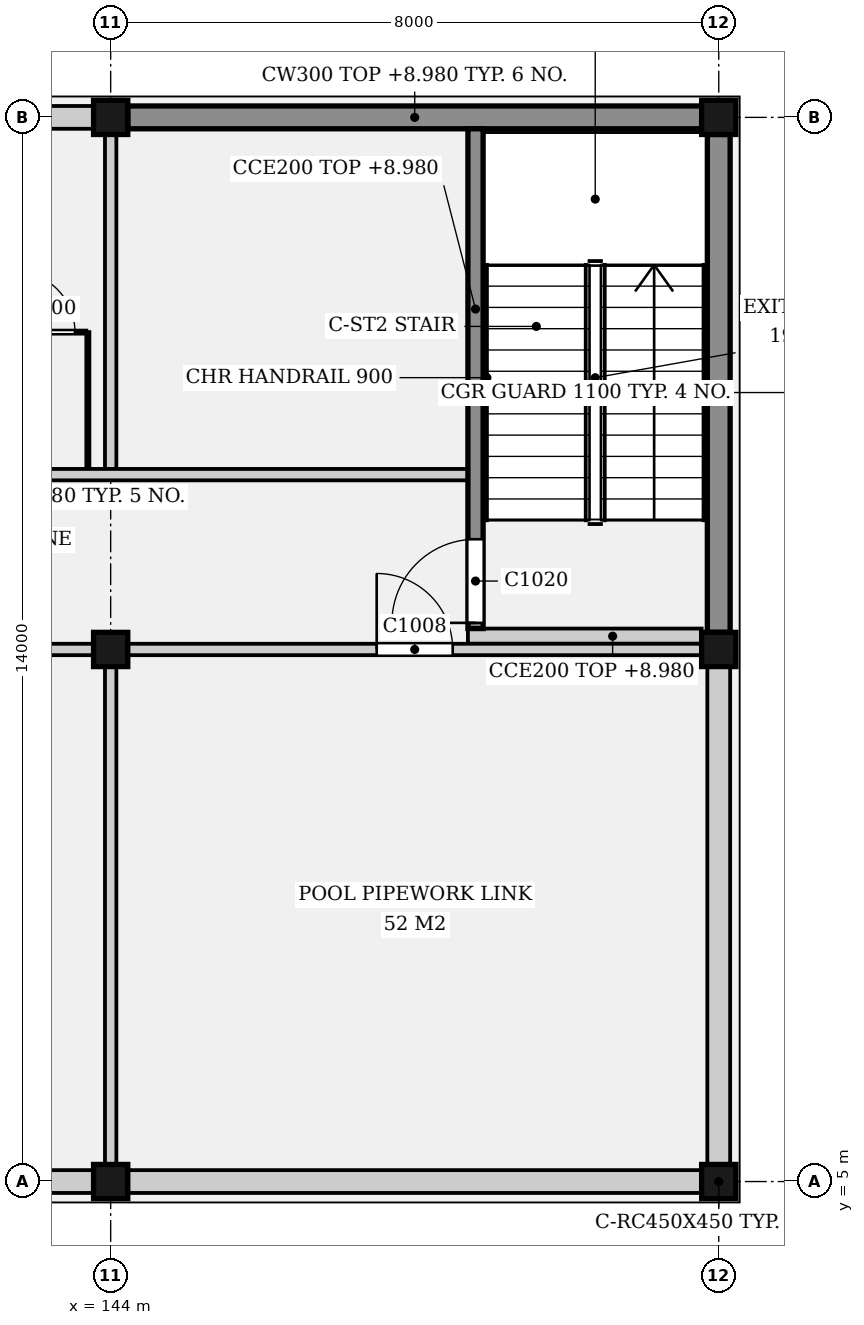
"""IFC4 building model, lengths in metres.
Left out: names, types, materials, properties, quantities, classifications, styles, units other than length and angle.
Written with IfcOpenShell. Run it as: python <this file> out.ifc"""

import sys

from ifc_helpers import new_model, si_unit, direction, frame, frame_2d, origin, origin_2d, place, context, subcontext, project, spatial, rectangle, extrude, element, fill, save


model = new_model("IFC4")
c1 = context("Model", 3, precision=1e-05, world=origin(), true_north=direction((0.0, 1.0)))
c2 = subcontext(c1, "Body", "Model", "MODEL_VIEW")
j1 = project(units=[si_unit("LENGTHUNIT", "METRE"), si_unit("PLANEANGLEUNIT", "RADIAN")], contexts=[c1])
p1 = place(None, origin())
s1 = spatial("IfcSite", under=j1, at=p1, CompositionType="ELEMENT")
p2 = place(p1, origin())
s2 = spatial("IfcBuilding", under=s1, at=p2, CompositionType="ELEMENT")
p3 = place(p2, frame((0.0, 0.0, 5.0)))
s3 = spatial("IfcBuildingStorey", under=s2, at=p3, CompositionType="ELEMENT", Elevation=5.0)
for number, where, z_axis, x_axis in (
    (1, (144.0, 5.0, 0.0), (0.0, 0.0, 1.0), (1.0, 0.0, 0.0)),
    (2, (144.0, 12.0, 0.0), (0.0, 0.0, 1.0), (1.0, 0.0, 0.0)),
    (3, (144.0, 19.0, 0.0), (0.0, 0.0, 1.0), (1.0, 0.0, 0.0)),
    (4, (152.0, 5.0, 0.0), (0.0, 0.0, 1.0), (1.0, 0.0, 0.0)),
    (5, (152.0, 12.0, 0.0), (0.0, 0.0, 1.0), (1.0, 0.0, 0.0)),
    (6, (152.0, 19.0, 0.0), (0.0, 0.0, 1.0), (1.0, 0.0, 0.0)),
):
    element("IfcColumn", number, at=place(p3, frame(where, z_axis=z_axis, x_axis=x_axis)), inside=s3, PredefinedType="COLUMN", context=c2, shape_type="SweptSolid", body=[
        extrude(rectangle(XDim=0.45, YDim=0.45, at=origin_2d()), origin(), (0.0, 0.0, 1.0), 4.4),
    ])
p4 = place(p3, frame((132.225, 5.0, 0.0), z_axis=(0.0, 0.0, 1.0), x_axis=(1.0, 0.0, 0.0)))
e7 = element("IfcWall", 7, at=p4, inside=s3, PredefinedType="ELEMENTEDWALL", context=c2, shape_type="SweptSolid", body=[
    extrude(rectangle(XDim=11.55, YDim=0.3, at=frame_2d((5.775, 0.0))), origin(), (0.0, 0.0, 1.0), 3.98),
])
p5 = place(p4, frame((1.458, 0.0, 1.4)))
e8 = element("IfcOpeningElement", 8, at=p5, cuts=e7, PredefinedType="OPENING", context=c2, shape_type="SweptSolid", body=[
    extrude(rectangle(XDim=1.6, YDim=1.2, at=frame_2d((0.8, 0.6))), frame((0.0, 0.16, 0.0), z_axis=(0.0, -1.0, 0.0), x_axis=(1.0, 0.0, 0.0)), (0.0, 0.0, 1.0), 0.32),
])
p6 = place(p4, frame((4.975, 0.0, 1.4)))
e9 = element("IfcOpeningElement", 9, at=p6, cuts=e7, PredefinedType="OPENING", context=c2, shape_type="SweptSolid", body=[
    extrude(rectangle(XDim=1.6, YDim=1.2, at=frame_2d((0.8, 0.6))), frame((0.0, 0.16, 0.0), z_axis=(0.0, -1.0, 0.0), x_axis=(1.0, 0.0, 0.0)), (0.0, 0.0, 1.0), 0.32),
])
p7 = place(p4, frame((8.492, 0.0, 1.4)))
e10 = element("IfcOpeningElement", 10, at=p7, cuts=e7, PredefinedType="OPENING", context=c2, shape_type="SweptSolid", body=[
    extrude(rectangle(XDim=1.6, YDim=1.2, at=frame_2d((0.8, 0.6))), frame((0.0, 0.16, 0.0), z_axis=(0.0, -1.0, 0.0), x_axis=(1.0, 0.0, 0.0)), (0.0, 0.0, 1.0), 0.32),
])
p8 = place(p3, frame((144.225, 5.0, 0.0), z_axis=(0.0, 0.0, 1.0), x_axis=(1.0, 0.0, 0.0)))
e11 = element("IfcWall", 11, at=p8, inside=s3, PredefinedType="ELEMENTEDWALL", context=c2, shape_type="SweptSolid", body=[
    extrude(rectangle(XDim=7.55, YDim=0.3, at=frame_2d((3.775, 0.0))), origin(), (0.0, 0.0, 1.0), 3.98),
])
p9 = place(p3, frame((132.225, 19.0, 0.0), z_axis=(0.0, 0.0, 1.0), x_axis=(1.0, 0.0, 0.0)))
e12 = element("IfcWall", 12, at=p9, inside=s3, PredefinedType="ELEMENTEDWALL", context=c2, shape_type="SweptSolid", body=[
    extrude(rectangle(XDim=11.55, YDim=0.3, at=frame_2d((5.775, 0.0))), origin(), (0.0, 0.0, 1.0), 3.98),
])
p10 = place(p9, frame((1.458, 0.0, 1.4)))
e13 = element("IfcOpeningElement", 13, at=p10, cuts=e12, PredefinedType="OPENING", context=c2, shape_type="SweptSolid", body=[
    extrude(rectangle(XDim=1.6, YDim=1.2, at=frame_2d((0.8, 0.6))), frame((0.0, 0.16, 0.0), z_axis=(0.0, -1.0, 0.0), x_axis=(1.0, 0.0, 0.0)), (0.0, 0.0, 1.0), 0.32),
])
p11 = place(p9, frame((4.975, 0.0, 1.4)))
e14 = element("IfcOpeningElement", 14, at=p11, cuts=e12, PredefinedType="OPENING", context=c2, shape_type="SweptSolid", body=[
    extrude(rectangle(XDim=1.6, YDim=1.2, at=frame_2d((0.8, 0.6))), frame((0.0, 0.16, 0.0), z_axis=(0.0, -1.0, 0.0), x_axis=(1.0, 0.0, 0.0)), (0.0, 0.0, 1.0), 0.32),
])
p12 = place(p9, frame((8.492, 0.0, 1.4)))
e15 = element("IfcOpeningElement", 15, at=p12, cuts=e12, PredefinedType="OPENING", context=c2, shape_type="SweptSolid", body=[
    extrude(rectangle(XDim=1.6, YDim=1.2, at=frame_2d((0.8, 0.6))), frame((0.0, 0.16, 0.0), z_axis=(0.0, -1.0, 0.0), x_axis=(1.0, 0.0, 0.0)), (0.0, 0.0, 1.0), 0.32),
])
p13 = place(p3, frame((144.225, 19.0, 0.0), z_axis=(0.0, 0.0, 1.0), x_axis=(1.0, 0.0, 0.0)))
e16 = element("IfcWall", 16, at=p13, inside=s3, PredefinedType="ELEMENTEDWALL", context=c2, shape_type="SweptSolid", body=[
    extrude(rectangle(XDim=7.55, YDim=0.3, at=frame_2d((3.775, 0.0))), origin(), (0.0, 0.0, 1.0), 3.98),
])
for number, where, z_axis, x_axis in (
    (17, (152.0, 5.225, 0.0), (0.0, 0.0, 1.0), (0.0, 1.0, 0.0)),
    (18, (152.0, 12.225, 0.0), (0.0, 0.0, 1.0), (0.0, 1.0, 0.0)),
):
    element("IfcWall", number, at=place(p3, frame(where, z_axis=z_axis, x_axis=x_axis)), inside=s3, PredefinedType="ELEMENTEDWALL", context=c2, shape_type="SweptSolid", body=[
        extrude(rectangle(XDim=6.55, YDim=0.3, at=frame_2d((3.275, 0.0))), origin(), (0.0, 0.0, 1.0), 3.98),
    ])
p14 = place(p3, frame((132.225, 12.0, 0.0), z_axis=(0.0, 0.0, 1.0), x_axis=(1.0, 0.0, 0.0)))
e19 = element("IfcWall", 19, at=p14, inside=s3, PredefinedType="PARTITIONING", context=c2, shape_type="SweptSolid", body=[
    extrude(rectangle(XDim=11.55, YDim=0.15, at=frame_2d((5.775, 0.0))), origin(), (0.0, 0.0, 1.0), 3.98),
])
p15 = place(p14, frame((5.275, 0.0, 0.0)))
e20 = element("IfcOpeningElement", 20, at=p15, cuts=e19, PredefinedType="OPENING", context=c2, shape_type="SweptSolid", body=[
    extrude(rectangle(XDim=1.0, YDim=2.1, at=frame_2d((0.5, 1.05))), frame((0.0, 0.085, 0.0), z_axis=(0.0, -1.0, 0.0), x_axis=(1.0, 0.0, 0.0)), (0.0, 0.0, 1.0), 0.17),
])
p16 = place(p3, frame((144.225, 12.0, 0.0), z_axis=(0.0, 0.0, 1.0), x_axis=(1.0, 0.0, 0.0)))
e21 = element("IfcWall", 21, at=p16, inside=s3, PredefinedType="PARTITIONING", context=c2, shape_type="SweptSolid", body=[
    extrude(rectangle(XDim=7.55, YDim=0.15, at=frame_2d((3.775, 0.0))), origin(), (0.0, 0.0, 1.0), 3.98),
])
p17 = place(p16, frame((3.275, 0.0, 0.0)))
e22 = element("IfcOpeningElement", 22, at=p17, cuts=e21, PredefinedType="OPENING", context=c2, shape_type="SweptSolid", body=[
    extrude(rectangle(XDim=1.0, YDim=2.1, at=frame_2d((0.5, 1.05))), frame((0.0, 0.085, 0.0), z_axis=(0.0, -1.0, 0.0), x_axis=(1.0, 0.0, 0.0)), (0.0, 0.0, 1.0), 0.17),
])
p18 = place(p3, frame((55.3, 14.3, 0.0), z_axis=(0.0, 0.0, 1.0), x_axis=(1.0, 0.0, 0.0)))
e23 = element("IfcWall", 23, at=p18, inside=s3, PredefinedType="PARTITIONING", context=c2, shape_type="SweptSolid", body=[
    extrude(rectangle(XDim=93.4, YDim=0.15, at=frame_2d((46.7, 0.0))), origin(), (0.0, 0.0, 1.0), 3.98),
])
p19 = place(p18, frame((15.8, 0.0, 0.0)))
e24 = element("IfcOpeningElement", 24, at=p19, cuts=e23, PredefinedType="OPENING", context=c2, shape_type="SweptSolid", body=[
    extrude(rectangle(XDim=1.8, YDim=2.4, at=frame_2d((0.9, 1.2))), frame((0.0, 0.085, 0.0), z_axis=(0.0, -1.0, 0.0), x_axis=(1.0, 0.0, 0.0)), (0.0, 0.0, 1.0), 0.17),
])
p20 = place(p18, frame((32.2, 0.0, 0.0)))
e25 = element("IfcOpeningElement", 25, at=p20, cuts=e23, PredefinedType="OPENING", context=c2, shape_type="SweptSolid", body=[
    extrude(rectangle(XDim=1.0, YDim=2.1, at=frame_2d((0.5, 1.05))), frame((0.0, 0.085, 0.0), z_axis=(0.0, -1.0, 0.0), x_axis=(1.0, 0.0, 0.0)), (0.0, 0.0, 1.0), 0.17),
])
p21 = place(p18, frame((38.2, 0.0, 0.0)))
e26 = element("IfcOpeningElement", 26, at=p21, cuts=e23, PredefinedType="OPENING", context=c2, shape_type="SweptSolid", body=[
    extrude(rectangle(XDim=1.0, YDim=2.1, at=frame_2d((0.5, 1.05))), frame((0.0, 0.085, 0.0), z_axis=(0.0, -1.0, 0.0), x_axis=(1.0, 0.0, 0.0)), (0.0, 0.0, 1.0), 0.17),
])
p22 = place(p18, frame((45.7, 0.0, 0.0)))
e27 = element("IfcOpeningElement", 27, at=p22, cuts=e23, PredefinedType="OPENING", context=c2, shape_type="SweptSolid", body=[
    extrude(rectangle(XDim=0.9, YDim=2.1, at=frame_2d((0.45, 1.05))), frame((0.0, 0.085, 0.0), z_axis=(0.0, -1.0, 0.0), x_axis=(1.0, 0.0, 0.0)), (0.0, 0.0, 1.0), 0.17),
])
p23 = place(p18, frame((58.2, 0.0, 0.0)))
e28 = element("IfcOpeningElement", 28, at=p23, cuts=e23, PredefinedType="OPENING", context=c2, shape_type="SweptSolid", body=[
    extrude(rectangle(XDim=1.0, YDim=2.1, at=frame_2d((0.5, 1.05))), frame((0.0, 0.085, 0.0), z_axis=(0.0, -1.0, 0.0), x_axis=(1.0, 0.0, 0.0)), (0.0, 0.0, 1.0), 0.17),
])
p24 = place(p18, frame((70.2, 0.0, 0.0)))
e29 = element("IfcOpeningElement", 29, at=p24, cuts=e23, PredefinedType="OPENING", context=c2, shape_type="SweptSolid", body=[
    extrude(rectangle(XDim=1.0, YDim=2.1, at=frame_2d((0.5, 1.05))), frame((0.0, 0.085, 0.0), z_axis=(0.0, -1.0, 0.0), x_axis=(1.0, 0.0, 0.0)), (0.0, 0.0, 1.0), 0.17),
])
p25 = place(p18, frame((81.68, 0.0, 0.0)))
e30 = element("IfcOpeningElement", 30, at=p25, cuts=e23, PredefinedType="OPENING", context=c2, shape_type="SweptSolid", body=[
    extrude(rectangle(XDim=0.9, YDim=2.1, at=frame_2d((0.45, 1.05))), frame((0.0, 0.085, 0.0), z_axis=(0.0, -1.0, 0.0), x_axis=(1.0, 0.0, 0.0)), (0.0, 0.0, 1.0), 0.17),
])
p26 = place(p3, frame((144.0, 5.225, 0.0), z_axis=(0.0, 0.0, 1.0), x_axis=(0.0, 1.0, 0.0)))
e31 = element("IfcWall", 31, at=p26, inside=s3, PredefinedType="PARTITIONING", context=c2, shape_type="SweptSolid", body=[
    extrude(rectangle(XDim=6.55, YDim=0.15, at=frame_2d((3.275, 0.0))), origin(), (0.0, 0.0, 1.0), 3.98),
])
p27 = place(p3, frame((144.0, 14.375, 0.0), z_axis=(0.0, 0.0, 1.0), x_axis=(0.0, 1.0, 0.0)))
e32 = element("IfcWall", 32, at=p27, inside=s3, PredefinedType="PARTITIONING", context=c2, shape_type="SweptSolid", body=[
    extrude(rectangle(XDim=4.4, YDim=0.15, at=frame_2d((2.2, 0.0))), origin(), (0.0, 0.0, 1.0), 3.98),
])
p28 = place(p3, frame((148.8, 12.275, 0.0), z_axis=(0.0, 0.0, 1.0), x_axis=(0.0, 1.0, 0.0)))
e33 = element("IfcWall", 33, at=p28, inside=s3, PredefinedType="SOLIDWALL", context=c2, shape_type="SweptSolid", body=[
    extrude(rectangle(XDim=6.575, YDim=0.2, at=frame_2d((3.288, 0.0))), origin(), (0.0, 0.0, 1.0), 3.98),
])
p29 = place(p28, frame((0.075, 0.0, 0.0)))
e34 = element("IfcOpeningElement", 34, at=p29, cuts=e33, PredefinedType="OPENING", context=c2, shape_type="SweptSolid", body=[
    extrude(rectangle(XDim=1.1, YDim=2.1, at=frame_2d((0.55, 1.05))), frame((0.0, 0.11, 0.0), z_axis=(0.0, -1.0, 0.0), x_axis=(1.0, 0.0, 0.0)), (0.0, 0.0, 1.0), 0.22),
])
p30 = place(p3, frame((148.7, 12.175, 0.0), z_axis=(0.0, 0.0, 1.0), x_axis=(1.0, 0.0, 0.0)))
e35 = element("IfcWall", 35, at=p30, inside=s3, PredefinedType="SOLIDWALL", context=c2, shape_type="SweptSolid", body=[
    extrude(rectangle(XDim=3.075, YDim=0.2, at=frame_2d((1.538, 0.0))), origin(), (0.0, 0.0, 1.0), 3.98),
])
p31 = place(p3, frame((143.7, 14.375, 0.0), z_axis=(0.0, 0.0, 1.0), x_axis=(0.0, 1.0, 0.0)))
e36 = element("IfcWall", 36, at=p31, inside=s3, PredefinedType="PARTITIONING", context=c2, shape_type="SweptSolid", body=[
    extrude(rectangle(XDim=1.8, YDim=0.04, at=frame_2d((0.9, 0.0))), origin(), (0.0, 0.0, 1.0), 2.4),
])
p32 = place(p3, frame((142.58, 16.175, 0.0), z_axis=(0.0, 0.0, 1.0), x_axis=(1.0, 0.0, 0.0)))
e37 = element("IfcWall", 37, at=p32, inside=s3, PredefinedType="PARTITIONING", context=c2, shape_type="SweptSolid", body=[
    extrude(rectangle(XDim=1.1, YDim=0.04, at=frame_2d((0.55, 0.0))), origin(), (0.0, 0.0, 1.0), 2.4),
])
p33 = place(p32, frame((0.15, 0.0, 0.0)))
e38 = element("IfcOpeningElement", 38, at=p33, cuts=e37, PredefinedType="OPENING", context=c2, shape_type="SweptSolid", body=[
    extrude(rectangle(XDim=0.8, YDim=2.0, at=frame_2d((0.4, 1.0))), frame((0.0, 0.03, 0.0), z_axis=(0.0, -1.0, 0.0), x_axis=(1.0, 0.0, 0.0)), (0.0, 0.0, 1.0), 0.06),
])
p34 = place(p17, origin())
e39 = element("IfcDoor", 39, at=p34, inside=s3, OperationType="SINGLE_SWING_LEFT", PredefinedType="DOOR", context=c2, shape_type="SweptSolid", body=[
    extrude(rectangle(XDim=1.0, YDim=2.1, at=frame_2d((0.5, 1.05))), frame((0.0, 0.025, 0.0), z_axis=(0.0, -1.0, 0.0), x_axis=(1.0, 0.0, 0.0)), (0.0, 0.0, 1.0), 0.05),
])
fill(e22, e39)
p35 = place(p29, origin())
e40 = element("IfcDoor", 40, at=p35, inside=s3, OperationType="SINGLE_SWING_LEFT", PredefinedType="DOOR", context=c2, shape_type="SweptSolid", body=[
    extrude(rectangle(XDim=1.1, YDim=2.1, at=frame_2d((0.55, 1.05))), frame((0.0, 0.025, 0.0), z_axis=(0.0, -1.0, 0.0), x_axis=(1.0, 0.0, 0.0)), (0.0, 0.0, 1.0), 0.05),
])
fill(e34, e40)
p36 = place(p33, origin())
e41 = element("IfcDoor", 41, at=p36, inside=s3, OperationType="SINGLE_SWING_LEFT", PredefinedType="DOOR", context=c2, shape_type="SweptSolid", body=[
    extrude(rectangle(XDim=0.8, YDim=2.0, at=frame_2d((0.4, 1.0))), frame((0.0, 0.02, 0.0), z_axis=(0.0, -1.0, 0.0), x_axis=(1.0, 0.0, 0.0)), (0.0, 0.0, 1.0), 0.04),
])
fill(e38, e41)
save(model, sys.argv[1])
